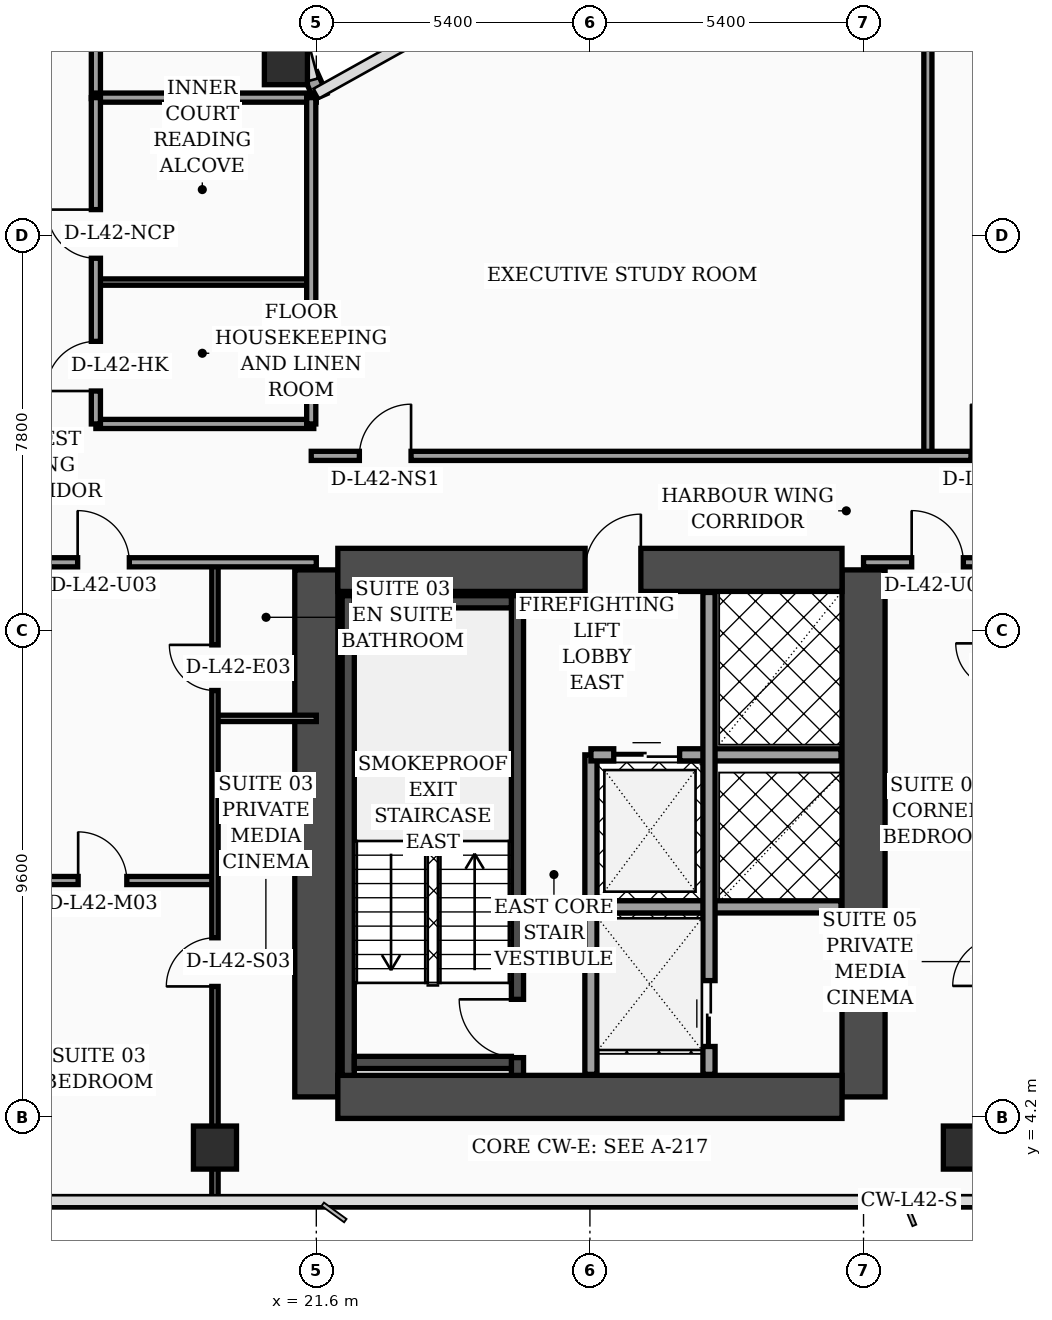
"""IFC4 building model, lengths in metres.
Left out: names, types, materials, properties, quantities, classifications, styles, units other than length and angle.
Written with IfcOpenShell. Run it as: python <this file> out.ifc"""

import sys

from ifc_helpers import new_model, si_unit, direction, frame, frame_2d, origin, origin_2d, place, context, subcontext, project, spatial, rectangle, hollow_rectangle, extrude, element, fill, save


model = new_model("IFC4")
c1 = context("Model", 3, precision=1e-05, world=origin(), true_north=direction((0.0, 1.0)))
c2 = subcontext(c1, "Body", "Model", "MODEL_VIEW")
j1 = project(units=[si_unit("LENGTHUNIT", "METRE"), si_unit("PLANEANGLEUNIT", "RADIAN")], contexts=[c1])
p1 = place(None, origin())
s1 = spatial("IfcSite", under=j1, at=p1, CompositionType="ELEMENT")
p2 = place(p1, origin())
s2 = spatial("IfcBuilding", under=s1, at=p2, CompositionType="ELEMENT")
p3 = place(p2, frame((0.0, 0.0, 171.3)))
s3 = spatial("IfcBuildingStorey", under=s2, at=p3, CompositionType="ELEMENT", Elevation=171.3)
for number, where, z_axis, x_axis in (
    (1, (21.6, 4.6, 0.0), (0.0, 0.0, 1.0), (0.0, 1.0, 0.0)),
    (2, (32.4, 4.6, 0.0), (0.0, 0.0, 1.0), (0.0, 1.0, 0.0)),
):
    element("IfcWall", number, at=place(p3, frame(where, z_axis=z_axis, x_axis=x_axis)), inside=s3, PredefinedType="SHEAR", context=c2, shape_type="SweptSolid", body=[
        extrude(rectangle(XDim=10.4, YDim=0.85, at=frame_2d((5.2, 0.0))), origin(), (0.0, 0.0, 1.0), 3.56),
    ])
p4 = place(p3, frame((22.025, 15.0, 0.0), z_axis=(0.0, 0.0, 1.0), x_axis=(1.0, 0.0, 0.0)))
e3 = element("IfcWall", 3, at=p4, inside=s3, PredefinedType="SHEAR", context=c2, shape_type="SweptSolid", body=[
    extrude(rectangle(XDim=9.95, YDim=0.85, at=frame_2d((4.975, 0.0))), origin(), (0.0, 0.0, 1.0), 3.56),
])
p5 = place(p4, frame((4.88, 0.0, 0.0)))
e4 = element("IfcOpeningElement", 4, at=p5, cuts=e3, PredefinedType="OPENING", context=c2, shape_type="SweptSolid", body=[
    extrude(rectangle(XDim=1.1, YDim=2.2, at=frame_2d((0.55, 1.1))), frame((0.0, 0.435, 0.0), z_axis=(0.0, -1.0, 0.0), x_axis=(1.0, 0.0, 0.0)), (0.0, 0.0, 1.0), 0.87),
])
p6 = place(p3, frame((22.025, 4.6, 0.0), z_axis=(0.0, 0.0, 1.0), x_axis=(1.0, 0.0, 0.0)))
e5 = element("IfcWall", 5, at=p6, inside=s3, PredefinedType="SHEAR", context=c2, shape_type="SweptSolid", body=[
    extrude(rectangle(XDim=9.95, YDim=0.85, at=frame_2d((4.975, 0.0))), origin(), (0.0, 0.0, 1.0), 3.56),
])
p7 = place(p3, frame((22.23, 5.025, 0.0), z_axis=(0.0, 0.0, 1.0), x_axis=(0.0, 1.0, 0.0)))
e6 = element("IfcWall", 6, at=p7, inside=s3, PredefinedType="SOLIDWALL", context=c2, shape_type="SweptSolid", body=[
    extrude(rectangle(XDim=9.465, YDim=0.24, at=frame_2d((4.732, 0.0))), origin(), (0.0, 0.0, 1.0), 3.56),
])
p8 = place(p3, frame((25.57, 5.025, 0.0), z_axis=(0.0, 0.0, 1.0), x_axis=(0.0, 1.0, 0.0)))
e7 = element("IfcWall", 7, at=p8, inside=s3, PredefinedType="SOLIDWALL", context=c2, shape_type="SweptSolid", body=[
    extrude(rectangle(XDim=9.465, YDim=0.24, at=frame_2d((4.732, 0.0))), origin(), (0.0, 0.0, 1.0), 3.56),
])
p9 = place(p8, frame((0.35, 0.0, 0.0)))
e8 = element("IfcOpeningElement", 8, at=p9, cuts=e7, PredefinedType="OPENING", context=c2, shape_type="SweptSolid", body=[
    extrude(rectangle(XDim=1.15, YDim=2.2, at=frame_2d((0.575, 1.1))), frame((0.0, 0.13, 0.0), z_axis=(0.0, -1.0, 0.0), x_axis=(1.0, 0.0, 0.0)), (0.0, 0.0, 1.0), 0.26),
])
for number, where, z_axis, x_axis in (
    (9, (22.35, 5.28, 0.0), (0.0, 0.0, 1.0), (1.0, 0.0, 0.0)),
    (10, (22.35, 14.37, 0.0), (0.0, 0.0, 1.0), (1.0, 0.0, 0.0)),
):
    element("IfcWall", number, at=place(p3, frame(where, z_axis=z_axis, x_axis=x_axis)), inside=s3, PredefinedType="SOLIDWALL", context=c2, shape_type="SweptSolid", body=[
        extrude(rectangle(XDim=3.1, YDim=0.24, at=frame_2d((1.55, 0.0))), origin(), (0.0, 0.0, 1.0), 3.56),
    ])
for number, where, z_axis, x_axis in (
    (11, (21.0, 25.0, 0.0), (0.0, 0.0, 1.0), (1.0, 0.0, 0.0)),
    (12, (19.6, 3.6, 0.0), (0.0, 0.0, 1.0), (1.0, 0.0, 0.0)),
    (13, (34.4, 3.6, 0.0), (0.0, 0.0, 1.0), (1.0, 0.0, 0.0)),
):
    element("IfcColumn", number, at=place(p3, frame(where, z_axis=z_axis, x_axis=x_axis)), inside=s3, PredefinedType="COLUMN", context=c2, shape_type="SweptSolid", body=[
        extrude(hollow_rectangle(XDim=0.85, YDim=0.85, WallThickness=0.036, at=origin_2d()), origin(), (0.0, 0.0, 1.0), 3.56),
    ])
p10 = place(p3, frame((21.68, 24.34, 0.0), z_axis=(0.0, 0.0, 1.0), x_axis=(-0.40758134973, 0.913168901875, 0.0)))
e14 = element("IfcWall", 14, at=p10, inside=s3, PredefinedType="SOLIDWALL", context=c2, shape_type="SweptSolid", body=[
    extrude(rectangle(XDim=0.471, YDim=0.28, at=frame_2d((0.235, 0.0))), origin(), (0.0, 0.0, 1.0), 3.56),
])
p11 = place(p3, frame((27.02, 5.045, 0.0), z_axis=(0.0, 0.0, 1.0), x_axis=(0.0, 1.0, 0.0)))
e15 = element("IfcWall", 15, at=p11, inside=s3, PredefinedType="SOLIDWALL", context=c2, shape_type="SweptSolid", body=[
    extrude(rectangle(XDim=6.305, YDim=0.24, at=frame_2d((3.153, 0.0))), origin(), (0.0, 0.0, 1.0), 3.56),
])
p12 = place(p3, frame((27.02, 11.35, 0.0), z_axis=(0.0, 0.0, 1.0), x_axis=(1.0, 0.0, 0.0)))
e16 = element("IfcWall", 16, at=p12, inside=s3, PredefinedType="SOLIDWALL", context=c2, shape_type="SweptSolid", body=[
    extrude(rectangle(XDim=4.935, YDim=0.24, at=frame_2d((2.468, 0.0))), origin(), (0.0, 0.0, 1.0), 3.56),
])
p13 = place(p12, frame((0.45, 0.0, 0.0)))
e17 = element("IfcOpeningElement", 17, at=p13, cuts=e16, PredefinedType="OPENING", context=c2, shape_type="SweptSolid", body=[
    extrude(rectangle(XDim=1.3, YDim=2.35, at=frame_2d((0.65, 1.175))), frame((0.0, 0.13, 0.0), z_axis=(0.0, -1.0, 0.0), x_axis=(1.0, 0.0, 0.0)), (0.0, 0.0, 1.0), 0.26),
])
p14 = place(p3, frame((27.02, 8.35, 0.0), z_axis=(0.0, 0.0, 1.0), x_axis=(1.0, 0.0, 0.0)))
e18 = element("IfcWall", 18, at=p14, inside=s3, PredefinedType="SOLIDWALL", context=c2, shape_type="SweptSolid", body=[
    extrude(rectangle(XDim=4.935, YDim=0.24, at=frame_2d((2.468, 0.0))), origin(), (0.0, 0.0, 1.0), 3.56),
])
p15 = place(p3, frame((29.35, 5.045, 0.0), z_axis=(0.0, 0.0, 1.0), x_axis=(0.0, 1.0, 0.0)))
e19 = element("IfcWall", 19, at=p15, inside=s3, PredefinedType="SOLIDWALL", context=c2, shape_type="SweptSolid", body=[
    extrude(rectangle(XDim=9.51, YDim=0.24, at=frame_2d((4.755, 0.0))), origin(), (0.0, 0.0, 1.0), 3.56),
])
p16 = place(p15, frame((0.55, 0.0, 0.0)))
e20 = element("IfcOpeningElement", 20, at=p16, cuts=e19, PredefinedType="OPENING", context=c2, shape_type="SweptSolid", body=[
    extrude(rectangle(XDim=1.3, YDim=2.35, at=frame_2d((0.65, 1.175))), frame((0.0, 0.13, 0.0), z_axis=(0.0, -1.0, 0.0), x_axis=(1.0, 0.0, 0.0)), (0.0, 0.0, 1.0), 0.26),
])
p17 = place(p3, frame((19.6, 12.07, 0.0), z_axis=(0.0, 0.0, 1.0), x_axis=(1.0, 0.0, 0.0)))
e21 = element("IfcWall", 21, at=p17, inside=s3, PredefinedType="PARTITIONING", context=c2, shape_type="SweptSolid", body=[
    extrude(rectangle(XDim=2.0, YDim=0.125, at=frame_2d((1.0, 0.0))), origin(), (0.0, 0.0, 1.0), 3.56),
])
p18 = place(p3, frame((15.15, 8.87, 0.0), z_axis=(0.0, 0.0, 1.0), x_axis=(1.0, 0.0, 0.0)))
e22 = element("IfcWall", 22, at=p18, inside=s3, PredefinedType="PARTITIONING", context=c2, shape_type="SweptSolid", body=[
    extrude(rectangle(XDim=4.45, YDim=0.16, at=frame_2d((2.225, 0.0))), origin(), (0.0, 0.0, 1.0), 3.56),
])
p19 = place(p18, frame((1.75, 0.0, 0.0)))
e23 = element("IfcOpeningElement", 23, at=p19, cuts=e22, PredefinedType="OPENING", context=c2, shape_type="SweptSolid", body=[
    extrude(rectangle(XDim=0.96, YDim=2.2, at=frame_2d((0.48, 1.1))), frame((0.0, 0.09, 0.0), z_axis=(0.0, -1.0, 0.0), x_axis=(1.0, 0.0, 0.0)), (0.0, 0.0, 1.0), 0.18),
])
p20 = place(p3, frame((19.6, 2.44, 0.0), z_axis=(0.0, 0.0, 1.0), x_axis=(0.0, 1.0, 0.0)))
e24 = element("IfcWall", 24, at=p20, inside=s3, PredefinedType="PARTITIONING", context=c2, shape_type="SweptSolid", body=[
    extrude(rectangle(XDim=12.71, YDim=0.125, at=frame_2d((6.355, 0.0))), origin(), (0.0, 0.0, 1.0), 2.49),
])
p21 = place(p20, frame((4.34, 0.0, 0.0)))
e25 = element("IfcOpeningElement", 25, at=p21, cuts=e24, PredefinedType="OPENING", context=c2, shape_type="SweptSolid", body=[
    extrude(rectangle(XDim=0.96, YDim=2.2, at=frame_2d((0.48, 1.1))), frame((0.0, 0.073, 0.0), z_axis=(0.0, -1.0, 0.0), x_axis=(1.0, 0.0, 0.0)), (0.0, 0.0, 1.0), 0.145),
])
p22 = place(p20, frame((10.18, 0.0, 0.0)))
e26 = element("IfcOpeningElement", 26, at=p22, cuts=e24, PredefinedType="OPENING", context=c2, shape_type="SweptSolid", body=[
    extrude(rectangle(XDim=0.9, YDim=2.15, at=frame_2d((0.45, 1.075))), frame((0.0, 0.073, 0.0), z_axis=(0.0, -1.0, 0.0), x_axis=(1.0, 0.0, 0.0)), (0.0, 0.0, 1.0), 0.145),
])
p23 = place(p3, frame((15.15, 15.15, 0.0), z_axis=(0.0, 0.0, 1.0), x_axis=(1.0, 0.0, 0.0)))
e27 = element("IfcWall", 27, at=p23, inside=s3, PredefinedType="PARTITIONING", context=c2, shape_type="SweptSolid", body=[
    extrude(rectangle(XDim=6.45, YDim=0.18, at=frame_2d((3.225, 0.0))), origin(), (0.0, 0.0, 1.0), 2.49),
])
p24 = place(p23, frame((1.74, 0.0, 0.0)))
e28 = element("IfcOpeningElement", 28, at=p24, cuts=e27, PredefinedType="OPENING", context=c2, shape_type="SweptSolid", body=[
    extrude(rectangle(XDim=1.02, YDim=2.2, at=frame_2d((0.51, 1.1))), frame((0.0, 0.1, 0.0), z_axis=(0.0, -1.0, 0.0), x_axis=(1.0, 0.0, 0.0)), (0.0, 0.0, 1.0), 0.2),
])
p25 = place(p3, frame((17.25, 24.3, 0.0), z_axis=(0.0, 0.0, 1.0), x_axis=(0.0, 1.0, 0.0)))
e29 = element("IfcWall", 29, at=p25, inside=s3, PredefinedType="PARTITIONING", context=c2, shape_type="SweptSolid", body=[
    extrude(rectangle(XDim=17.65, YDim=0.18, at=frame_2d((8.825, 0.0))), origin(), (0.0, 0.0, 1.0), 2.94),
])
p26 = place(p3, frame((17.25, 17.88, 0.0), z_axis=(0.0, 0.0, 1.0), x_axis=(1.0, 0.0, 0.0)))
e30 = element("IfcWall", 30, at=p26, inside=s3, PredefinedType="PARTITIONING", context=c2, shape_type="SweptSolid", body=[
    extrude(rectangle(XDim=4.3, YDim=0.18, at=frame_2d((2.15, 0.0))), origin(), (0.0, 0.0, 1.0), 3.09),
])
p27 = place(p3, frame((17.25, 20.68, 0.0), z_axis=(0.0, 0.0, 1.0), x_axis=(1.0, 0.0, 0.0)))
e31 = element("IfcWall", 31, at=p27, inside=s3, PredefinedType="PARTITIONING", context=c2, shape_type="SweptSolid", body=[
    extrude(rectangle(XDim=4.3, YDim=0.125, at=frame_2d((2.15, 0.0))), origin(), (0.0, 0.0, 1.0), 3.56),
])
p28 = place(p3, frame((17.25, 24.32, 0.0), z_axis=(0.0, 0.0, 1.0), x_axis=(1.0, 0.0, 0.0)))
e32 = element("IfcWall", 32, at=p28, inside=s3, PredefinedType="PARTITIONING", context=c2, shape_type="SweptSolid", body=[
    extrude(rectangle(XDim=4.35, YDim=0.18, at=frame_2d((2.175, 0.0))), origin(), (0.0, 0.0, 1.0), 3.56),
])
p29 = place(p3, frame((21.5, 17.88, 0.0), z_axis=(0.0, 0.0, 1.0), x_axis=(0.0, 1.0, 0.0)))
e33 = element("IfcWall", 33, at=p29, inside=s3, PredefinedType="PARTITIONING", context=c2, shape_type="SweptSolid", body=[
    extrude(rectangle(XDim=6.44, YDim=0.18, at=frame_2d((3.22, 0.0))), origin(), (0.0, 0.0, 1.0), 3.09),
])
p30 = place(p3, frame((17.25, 17.88, 0.0), z_axis=(0.0, 0.0, 1.0), x_axis=(0.0, 1.0, 0.0)))
e34 = element("IfcWall", 34, at=p30, inside=s3, PredefinedType="PARTITIONING", context=c2, shape_type="SweptSolid", body=[
    extrude(rectangle(XDim=6.44, YDim=0.18, at=frame_2d((3.22, 0.0))), origin(), (0.0, 0.0, 1.0), 3.09),
])
p31 = place(p30, frame((0.65, 0.0, 0.0)))
e35 = element("IfcOpeningElement", 35, at=p31, cuts=e34, PredefinedType="OPENING", context=c2, shape_type="SweptSolid", body=[
    extrude(rectangle(XDim=0.98, YDim=2.15, at=frame_2d((0.49, 1.075))), frame((0.0, 0.1, 0.0), z_axis=(0.0, -1.0, 0.0), x_axis=(1.0, 0.0, 0.0)), (0.0, 0.0, 1.0), 0.2),
])
p32 = place(p30, frame((3.27, 0.0, 0.0)))
e36 = element("IfcOpeningElement", 36, at=p32, cuts=e34, PredefinedType="OPENING", context=c2, shape_type="SweptSolid", body=[
    extrude(rectangle(XDim=0.96, YDim=2.2, at=frame_2d((0.48, 1.1))), frame((0.0, 0.1, 0.0), z_axis=(0.0, -1.0, 0.0), x_axis=(1.0, 0.0, 0.0)), (0.0, 0.0, 1.0), 0.2),
])
p33 = place(p3, frame((32.4, 15.15, 0.0), z_axis=(0.0, 0.0, 1.0), x_axis=(1.0, 0.0, 0.0)))
e37 = element("IfcWall", 37, at=p33, inside=s3, PredefinedType="PARTITIONING", context=c2, shape_type="SweptSolid", body=[
    extrude(rectangle(XDim=20.2, YDim=0.18, at=frame_2d((10.1, 0.0))), origin(), (0.0, 0.0, 1.0), 2.94),
])
p34 = place(p33, frame((0.95, 0.0, 0.0)))
e38 = element("IfcOpeningElement", 38, at=p34, cuts=e37, PredefinedType="OPENING", context=c2, shape_type="SweptSolid", body=[
    extrude(rectangle(XDim=1.02, YDim=2.2, at=frame_2d((0.51, 1.1))), frame((0.0, 0.1, 0.0), z_axis=(0.0, -1.0, 0.0), x_axis=(1.0, 0.0, 0.0)), (0.0, 0.0, 1.0), 0.2),
])
p35 = place(p33, frame((5.95, 0.0, 0.0)))
e39 = element("IfcOpeningElement", 39, at=p35, cuts=e37, PredefinedType="OPENING", context=c2, shape_type="SweptSolid", body=[
    extrude(rectangle(XDim=1.02, YDim=2.2, at=frame_2d((0.51, 1.1))), frame((0.0, 0.1, 0.0), z_axis=(0.0, -1.0, 0.0), x_axis=(1.0, 0.0, 0.0)), (0.0, 0.0, 1.0), 0.2),
])
p36 = place(p33, frame((11.22, 0.0, 0.0)))
e40 = element("IfcOpeningElement", 40, at=p36, cuts=e37, PredefinedType="OPENING", context=c2, shape_type="SweptSolid", body=[
    extrude(rectangle(XDim=1.02, YDim=2.2, at=frame_2d((0.51, 1.1))), frame((0.0, 0.1, 0.0), z_axis=(0.0, -1.0, 0.0), x_axis=(1.0, 0.0, 0.0)), (0.0, 0.0, 1.0), 0.2),
])
p37 = place(p33, frame((16.22, 0.0, 0.0)))
e41 = element("IfcOpeningElement", 41, at=p37, cuts=e37, PredefinedType="OPENING", context=c2, shape_type="SweptSolid", body=[
    extrude(rectangle(XDim=1.02, YDim=2.2, at=frame_2d((0.51, 1.1))), frame((0.0, 0.1, 0.0), z_axis=(0.0, -1.0, 0.0), x_axis=(1.0, 0.0, 0.0)), (0.0, 0.0, 1.0), 0.2),
])
p38 = place(p3, frame((33.67, 17.25, 0.0), z_axis=(0.0, 0.0, 1.0), x_axis=(0.0, 1.0, 0.0)))
e42 = element("IfcWall", 42, at=p38, inside=s3, PredefinedType="PARTITIONING", context=c2, shape_type="SweptSolid", body=[
    extrude(rectangle(XDim=13.96, YDim=0.16, at=frame_2d((6.98, 0.0))), origin(), (0.0, 0.0, 1.0), 2.94),
])
p39 = place(p3, frame((21.5, 17.25, 0.0), z_axis=(0.0, 0.0, 1.0), x_axis=(1.0, 0.0, 0.0)))
e43 = element("IfcWall", 43, at=p39, inside=s3, PredefinedType="PARTITIONING", context=c2, shape_type="SweptSolid", body=[
    extrude(rectangle(XDim=24.25, YDim=0.18, at=frame_2d((12.125, 0.0))), origin(), (0.0, 0.0, 1.0), 2.94),
])
p40 = place(p39, frame((0.95, 0.0, 0.0)))
e44 = element("IfcOpeningElement", 44, at=p40, cuts=e43, PredefinedType="OPENING", context=c2, shape_type="SweptSolid", body=[
    extrude(rectangle(XDim=1.02, YDim=2.2, at=frame_2d((0.51, 1.1))), frame((0.0, 0.1, 0.0), z_axis=(0.0, -1.0, 0.0), x_axis=(1.0, 0.0, 0.0)), (0.0, 0.0, 1.0), 0.2),
])
p41 = place(p39, frame((13.02, 0.0, 0.0)))
e45 = element("IfcOpeningElement", 45, at=p41, cuts=e43, PredefinedType="OPENING", context=c2, shape_type="SweptSolid", body=[
    extrude(rectangle(XDim=1.02, YDim=2.2, at=frame_2d((0.51, 1.1))), frame((0.0, 0.1, 0.0), z_axis=(0.0, -1.0, 0.0), x_axis=(1.0, 0.0, 0.0)), (0.0, 0.0, 1.0), 0.2),
])
p42 = place(p13, origin())
e46 = element("IfcDoor", 46, at=p42, inside=s3, OperationType="DOUBLE_DOOR_SLIDING", PredefinedType="DOOR", context=c2, shape_type="SweptSolid", body=[
    extrude(rectangle(XDim=1.3, YDim=2.35, at=frame_2d((0.65, 1.175))), frame((0.0, 0.025, 0.0), z_axis=(0.0, -1.0, 0.0), x_axis=(1.0, 0.0, 0.0)), (0.0, 0.0, 1.0), 0.05),
])
fill(e17, e46)
p43 = place(p16, origin())
e47 = element("IfcDoor", 47, at=p43, inside=s3, OperationType="DOUBLE_DOOR_SLIDING", PredefinedType="DOOR", context=c2, shape_type="SweptSolid", body=[
    extrude(rectangle(XDim=1.3, YDim=2.35, at=frame_2d((0.65, 1.175))), frame((0.0, 0.025, 0.0), z_axis=(0.0, -1.0, 0.0), x_axis=(1.0, 0.0, 0.0)), (0.0, 0.0, 1.0), 0.05),
])
fill(e20, e47)
p44 = place(p19, origin())
e48 = element("IfcDoor", 48, at=p44, inside=s3, OperationType="SINGLE_SWING_LEFT", PredefinedType="DOOR", context=c2, shape_type="SweptSolid", body=[
    extrude(rectangle(XDim=0.96, YDim=2.2, at=frame_2d((0.48, 1.1))), frame((0.0, 0.025, 0.0), z_axis=(0.0, -1.0, 0.0), x_axis=(1.0, 0.0, 0.0)), (0.0, 0.0, 1.0), 0.05),
])
fill(e23, e48)
p45 = place(p21, origin())
e49 = element("IfcDoor", 49, at=p45, inside=s3, OperationType="SINGLE_SWING_LEFT", PredefinedType="DOOR", context=c2, shape_type="SweptSolid", body=[
    extrude(rectangle(XDim=0.96, YDim=2.2, at=frame_2d((0.48, 1.1))), frame((0.0, 0.025, 0.0), z_axis=(0.0, -1.0, 0.0), x_axis=(1.0, 0.0, 0.0)), (0.0, 0.0, 1.0), 0.05),
])
fill(e25, e49)
p46 = place(p22, origin())
e50 = element("IfcDoor", 50, at=p46, inside=s3, OperationType="SINGLE_SWING_RIGHT", PredefinedType="DOOR", context=c2, shape_type="SweptSolid", body=[
    extrude(rectangle(XDim=0.9, YDim=2.15, at=frame_2d((0.45, 1.075))), frame((0.0, 0.025, 0.0), z_axis=(0.0, -1.0, 0.0), x_axis=(1.0, 0.0, 0.0)), (0.0, 0.0, 1.0), 0.05),
])
fill(e26, e50)
p47 = place(p24, origin())
e51 = element("IfcDoor", 51, at=p47, inside=s3, OperationType="SINGLE_SWING_LEFT", PredefinedType="DOOR", context=c2, shape_type="SweptSolid", body=[
    extrude(rectangle(XDim=1.02, YDim=2.2, at=frame_2d((0.51, 1.1))), frame((0.0, 0.025, 0.0), z_axis=(0.0, -1.0, 0.0), x_axis=(1.0, 0.0, 0.0)), (0.0, 0.0, 1.0), 0.05),
])
fill(e28, e51)
p48 = place(p31, origin())
e52 = element("IfcDoor", 52, at=p48, inside=s3, OperationType="SINGLE_SWING_LEFT", PredefinedType="DOOR", context=c2, shape_type="SweptSolid", body=[
    extrude(rectangle(XDim=0.98, YDim=2.15, at=frame_2d((0.49, 1.075))), frame((0.0, 0.025, 0.0), z_axis=(0.0, -1.0, 0.0), x_axis=(1.0, 0.0, 0.0)), (0.0, 0.0, 1.0), 0.05),
])
fill(e35, e52)
p49 = place(p32, origin())
e53 = element("IfcDoor", 53, at=p49, inside=s3, OperationType="SINGLE_SWING_RIGHT", PredefinedType="DOOR", context=c2, shape_type="SweptSolid", body=[
    extrude(rectangle(XDim=0.96, YDim=2.2, at=frame_2d((0.48, 1.1))), frame((0.0, 0.025, 0.0), z_axis=(0.0, -1.0, 0.0), x_axis=(1.0, 0.0, 0.0)), (0.0, 0.0, 1.0), 0.05),
])
fill(e36, e53)
p50 = place(p34, origin())
e54 = element("IfcDoor", 54, at=p50, inside=s3, OperationType="SINGLE_SWING_LEFT", PredefinedType="DOOR", context=c2, shape_type="SweptSolid", body=[
    extrude(rectangle(XDim=1.02, YDim=2.2, at=frame_2d((0.51, 1.1))), frame((0.0, 0.025, 0.0), z_axis=(0.0, -1.0, 0.0), x_axis=(1.0, 0.0, 0.0)), (0.0, 0.0, 1.0), 0.05),
])
fill(e38, e54)
p51 = place(p40, origin())
e55 = element("IfcDoor", 55, at=p51, inside=s3, OperationType="SINGLE_SWING_RIGHT", PredefinedType="DOOR", context=c2, shape_type="SweptSolid", body=[
    extrude(rectangle(XDim=1.02, YDim=2.2, at=frame_2d((0.51, 1.1))), frame((0.0, 0.025, 0.0), z_axis=(0.0, -1.0, 0.0), x_axis=(1.0, 0.0, 0.0)), (0.0, 0.0, 1.0), 0.05),
])
fill(e44, e55)
p52 = place(p41, origin())
e56 = element("IfcDoor", 56, at=p52, inside=s3, OperationType="SINGLE_SWING_LEFT", PredefinedType="DOOR", context=c2, shape_type="SweptSolid", body=[
    extrude(rectangle(XDim=1.02, YDim=2.2, at=frame_2d((0.51, 1.1))), frame((0.0, 0.025, 0.0), z_axis=(0.0, -1.0, 0.0), x_axis=(1.0, 0.0, 0.0)), (0.0, 0.0, 1.0), 0.05),
])
fill(e45, e56)
p53 = place(p9, origin())
e57 = element("IfcDoor", 57, at=p53, inside=s3, OperationType="SINGLE_SWING_RIGHT", PredefinedType="DOOR", context=c2, shape_type="SweptSolid", body=[
    extrude(rectangle(XDim=1.15, YDim=2.2, at=frame_2d((0.575, 1.1))), frame((0.0, 0.025, 0.0), z_axis=(0.0, -1.0, 0.0), x_axis=(1.0, 0.0, 0.0)), (0.0, 0.0, 1.0), 0.05),
])
fill(e8, e57)
p54 = place(p5, origin())
e58 = element("IfcDoor", 58, at=p54, inside=s3, OperationType="SINGLE_SWING_RIGHT", PredefinedType="DOOR", context=c2, shape_type="SweptSolid", body=[
    extrude(rectangle(XDim=1.1, YDim=2.2, at=frame_2d((0.55, 1.1))), frame((0.0, 0.025, 0.0), z_axis=(0.0, -1.0, 0.0), x_axis=(1.0, 0.0, 0.0)), (0.0, 0.0, 1.0), 0.05),
])
fill(e4, e58)
save(model, sys.argv[1])
